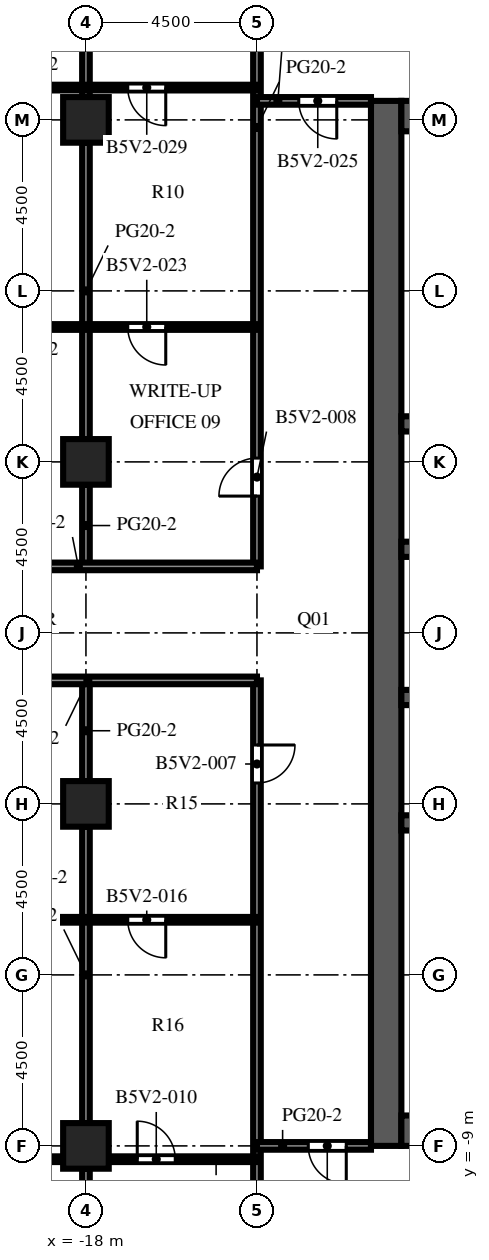
"""IFC4 building model, lengths in metres.
Left out: names, types, materials, properties, quantities, classifications, styles, units other than length and angle.
Written with IfcOpenShell. Run it as: python <this file> out.ifc"""

import sys

from ifc_helpers import new_model, si_unit, direction, frame, frame_2d, origin, origin_2d, place, context, subcontext, project, spatial, rectangle, extrude, element, fill, save


model = new_model("IFC4")
c1 = context("Model", 3, precision=1e-05, world=origin(), true_north=direction((0.0, 1.0)))
c2 = subcontext(c1, "Body", "Model", "MODEL_VIEW")
j1 = project(units=[si_unit("LENGTHUNIT", "METRE"), si_unit("PLANEANGLEUNIT", "RADIAN")], contexts=[c1])
p1 = place(None, origin())
s1 = spatial("IfcSite", under=j1, at=p1, CompositionType="ELEMENT")
p2 = place(p1, origin())
s2 = spatial("IfcBuilding", under=s1, at=p2, CompositionType="ELEMENT")
p3 = place(p2, frame((0.0, 0.0, 181.4)))
s3 = spatial("IfcBuildingStorey", under=s2, at=p3, CompositionType="ELEMENT", Elevation=181.4)
for number, where, z_axis, x_axis in (
    (1, (-18.0, -9.0, 0.0), (0.0, 0.0, 1.0), (1.0, 0.0, 0.0)),
    (2, (-18.0, 0.0, 0.0), (0.0, 0.0, 1.0), (1.0, 0.0, 0.0)),
    (3, (-18.0, 9.0, 0.0), (0.0, 0.0, 1.0), (1.0, 0.0, 0.0)),
    (4, (-18.0, 18.0, 0.0), (0.0, 0.0, 1.0), (1.0, 0.0, 0.0)),
):
    element("IfcColumn", number, at=place(p3, frame(where, z_axis=z_axis, x_axis=x_axis)), inside=s3, PredefinedType="COLUMN", context=c2, shape_type="SweptSolid", body=[
        extrude(rectangle(XDim=1.2, YDim=1.2, at=origin_2d()), origin(), (0.0, 0.0, 1.0), 4.1),
    ])
p4 = place(p3, frame((-10.1, -9.0, 0.0), z_axis=(0.0, 0.0, 1.0), x_axis=(0.0, 1.0, 0.0)))
e5 = element("IfcWall", 5, at=p4, inside=s3, PredefinedType="SHEAR", context=c2, shape_type="SweptSolid", body=[
    extrude(rectangle(XDim=27.5, YDim=0.8, at=frame_2d((13.75, 0.0))), origin(), (0.0, 0.0, 1.0), 4.1),
])
p5 = place(p4, frame((12.55, 0.0, 0.0)))
e6 = element("IfcOpeningElement", 6, at=p5, cuts=e5, PredefinedType="OPENING", context=c2, shape_type="SweptSolid", body=[
    extrude(rectangle(XDim=2.4, YDim=2.4, at=frame_2d((1.2, 1.2))), frame((0.0, 0.41, 0.0), z_axis=(0.0, -1.0, 0.0), x_axis=(1.0, 0.0, 0.0)), (0.0, 0.0, 1.0), 0.82),
])
p6 = place(p4, frame((6.825, 0.0, 0.0)))
e7 = element("IfcOpeningElement", 7, at=p6, cuts=e5, PredefinedType="OPENING", context=c2, shape_type="SweptSolid", body=[
    extrude(rectangle(XDim=1.2, YDim=2.1, at=frame_2d((0.6, 1.05))), frame((0.0, 0.41, 0.0), z_axis=(0.0, -1.0, 0.0), x_axis=(1.0, 0.0, 0.0)), (0.0, 0.0, 1.0), 0.82),
])
p7 = place(p4, frame((19.475, 0.0, 0.0)))
e8 = element("IfcOpeningElement", 8, at=p7, cuts=e5, PredefinedType="OPENING", context=c2, shape_type="SweptSolid", body=[
    extrude(rectangle(XDim=1.2, YDim=2.1, at=frame_2d((0.6, 1.05))), frame((0.0, 0.41, 0.0), z_axis=(0.0, -1.0, 0.0), x_axis=(1.0, 0.0, 0.0)), (0.0, 0.0, 1.0), 0.82),
])
for number, where, z_axis, x_axis in (
    (9, (-9.7, -8.6, 0.0), (0.0, 0.0, 1.0), (1.0, 0.0, 0.0)),
    (10, (-9.7, 18.1, 0.0), (0.0, 0.0, 1.0), (1.0, 0.0, 0.0)),
):
    element("IfcWall", number, at=place(p3, frame(where, z_axis=z_axis, x_axis=x_axis)), inside=s3, PredefinedType="SHEAR", context=c2, shape_type="SweptSolid", body=[
        extrude(rectangle(XDim=10.4, YDim=0.8, at=frame_2d((5.2, 0.0))), origin(), (0.0, 0.0, 1.0), 4.1),
    ])
p8 = place(p3, frame((-9.7, -0.5, 0.0), z_axis=(0.0, 0.0, 1.0), x_axis=(1.0, 0.0, 0.0)))
e11 = element("IfcWall", 11, at=p8, inside=s3, PredefinedType="SHEAR", context=c2, shape_type="SweptSolid", body=[
    extrude(rectangle(XDim=10.4, YDim=0.4, at=frame_2d((5.2, 0.0))), origin(), (0.0, 0.0, 1.0), 4.1),
])
p9 = place(p3, frame((-9.7, 2.8, 0.0), z_axis=(0.0, 0.0, 1.0), x_axis=(1.0, 0.0, 0.0)))
e12 = element("IfcWall", 12, at=p9, inside=s3, PredefinedType="SHEAR", context=c2, shape_type="SweptSolid", body=[
    extrude(rectangle(XDim=10.4, YDim=0.4, at=frame_2d((5.2, 0.0))), origin(), (0.0, 0.0, 1.0), 4.1),
])
p10 = place(p9, frame((0.738, 0.0, 0.0)))
e13 = element("IfcOpeningElement", 13, at=p10, cuts=e12, PredefinedType="OPENING", context=c2, shape_type="SweptSolid", body=[
    extrude(rectangle(XDim=1.1, YDim=2.1, at=frame_2d((0.55, 1.05))), frame((0.0, 0.21, 0.0), z_axis=(0.0, -1.0, 0.0), x_axis=(1.0, 0.0, 0.0)), (0.0, 0.0, 1.0), 0.42),
])
p11 = place(p9, frame((3.337, 0.0, 0.0)))
e14 = element("IfcOpeningElement", 14, at=p11, cuts=e12, PredefinedType="OPENING", context=c2, shape_type="SweptSolid", body=[
    extrude(rectangle(XDim=1.1, YDim=2.1, at=frame_2d((0.55, 1.05))), frame((0.0, 0.21, 0.0), z_axis=(0.0, -1.0, 0.0), x_axis=(1.0, 0.0, 0.0)), (0.0, 0.0, 1.0), 0.42),
])
p12 = place(p9, frame((6.012, 0.0, 0.0)))
e15 = element("IfcOpeningElement", 15, at=p12, cuts=e12, PredefinedType="OPENING", context=c2, shape_type="SweptSolid", body=[
    extrude(rectangle(XDim=1.0, YDim=2.1, at=frame_2d((0.5, 1.05))), frame((0.0, 0.21, 0.0), z_axis=(0.0, -1.0, 0.0), x_axis=(1.0, 0.0, 0.0)), (0.0, 0.0, 1.0), 0.42),
])
p13 = place(p9, frame((8.613, 0.0, 0.0)))
e16 = element("IfcOpeningElement", 16, at=p13, cuts=e12, PredefinedType="OPENING", context=c2, shape_type="SweptSolid", body=[
    extrude(rectangle(XDim=1.0, YDim=2.1, at=frame_2d((0.5, 1.05))), frame((0.0, 0.21, 0.0), z_axis=(0.0, -1.0, 0.0), x_axis=(1.0, 0.0, 0.0)), (0.0, 0.0, 1.0), 0.42),
])
p14 = place(p3, frame((-9.7, 6.7, 0.0), z_axis=(0.0, 0.0, 1.0), x_axis=(1.0, 0.0, 0.0)))
e17 = element("IfcWall", 17, at=p14, inside=s3, PredefinedType="SHEAR", context=c2, shape_type="SweptSolid", body=[
    extrude(rectangle(XDim=10.4, YDim=0.4, at=frame_2d((5.2, 0.0))), origin(), (0.0, 0.0, 1.0), 4.1),
])
p15 = place(p14, frame((3.337, 0.0, 0.0)))
e18 = element("IfcOpeningElement", 18, at=p15, cuts=e17, PredefinedType="OPENING", context=c2, shape_type="SweptSolid", body=[
    extrude(rectangle(XDim=1.1, YDim=2.1, at=frame_2d((0.55, 1.05))), frame((0.0, 0.21, 0.0), z_axis=(0.0, -1.0, 0.0), x_axis=(1.0, 0.0, 0.0)), (0.0, 0.0, 1.0), 0.42),
])
p16 = place(p14, frame((5.962, 0.0, 0.0)))
e19 = element("IfcOpeningElement", 19, at=p16, cuts=e17, PredefinedType="OPENING", context=c2, shape_type="SweptSolid", body=[
    extrude(rectangle(XDim=1.1, YDim=2.1, at=frame_2d((0.55, 1.05))), frame((0.0, 0.21, 0.0), z_axis=(0.0, -1.0, 0.0), x_axis=(1.0, 0.0, 0.0)), (0.0, 0.0, 1.0), 0.42),
])
p17 = place(p14, frame((8.663, 0.0, 0.0)))
e20 = element("IfcOpeningElement", 20, at=p17, cuts=e17, PredefinedType="OPENING", context=c2, shape_type="SweptSolid", body=[
    extrude(rectangle(XDim=1.1, YDim=2.1, at=frame_2d((0.55, 1.05))), frame((0.0, 0.21, 0.0), z_axis=(0.0, -1.0, 0.0), x_axis=(1.0, 0.0, 0.0)), (0.0, 0.0, 1.0), 0.42),
])
p18 = place(p14, frame((0.688, 0.0, 0.0)))
e21 = element("IfcOpeningElement", 21, at=p18, cuts=e17, PredefinedType="OPENING", context=c2, shape_type="SweptSolid", body=[
    extrude(rectangle(XDim=1.0, YDim=2.1, at=frame_2d((0.5, 1.05))), frame((0.0, 0.21, 0.0), z_axis=(0.0, -1.0, 0.0), x_axis=(1.0, 0.0, 0.0)), (0.0, 0.0, 1.0), 0.42),
])
p19 = place(p3, frame((-9.7, 10.0, 0.0), z_axis=(0.0, 0.0, 1.0), x_axis=(1.0, 0.0, 0.0)))
e22 = element("IfcWall", 22, at=p19, inside=s3, PredefinedType="SHEAR", context=c2, shape_type="SweptSolid", body=[
    extrude(rectangle(XDim=10.4, YDim=0.4, at=frame_2d((5.2, 0.0))), origin(), (0.0, 0.0, 1.0), 4.1),
])
for number, where, z_axis, x_axis in (
    (23, (-18.0, -17.4, 0.0), (0.0, 0.0, 1.0), (0.0, 1.0, 0.0)),
    (24, (-18.0, -8.4, 0.0), (0.0, 0.0, 1.0), (0.0, 1.0, 0.0)),
):
    element("IfcWall", number, at=place(p3, frame(where, z_axis=z_axis, x_axis=x_axis)), inside=s3, PredefinedType="PARTITIONING", context=c2, shape_type="SweptSolid", body=[
        extrude(rectangle(XDim=7.8, YDim=0.2, at=frame_2d((3.9, 0.0))), origin(), (0.0, 0.0, 1.0), 3.5),
    ])
p20 = place(p3, frame((-18.0, 0.6, 0.0), z_axis=(0.0, 0.0, 1.0), x_axis=(0.0, 1.0, 0.0)))
e25 = element("IfcWall", 25, at=p20, inside=s3, PredefinedType="PARTITIONING", context=c2, shape_type="SweptSolid", body=[
    extrude(rectangle(XDim=2.65, YDim=0.2, at=frame_2d((1.325, 0.0))), origin(), (0.0, 0.0, 1.0), 3.5),
])
p21 = place(p3, frame((-18.0, 6.25, 0.0), z_axis=(0.0, 0.0, 1.0), x_axis=(0.0, 1.0, 0.0)))
e26 = element("IfcWall", 26, at=p21, inside=s3, PredefinedType="PARTITIONING", context=c2, shape_type="SweptSolid", body=[
    extrude(rectangle(XDim=2.15, YDim=0.2, at=frame_2d((1.075, 0.0))), origin(), (0.0, 0.0, 1.0), 3.5),
])
p22 = place(p3, frame((-18.0, 9.6, 0.0), z_axis=(0.0, 0.0, 1.0), x_axis=(0.0, 1.0, 0.0)))
e27 = element("IfcWall", 27, at=p22, inside=s3, PredefinedType="PARTITIONING", context=c2, shape_type="SweptSolid", body=[
    extrude(rectangle(XDim=7.8, YDim=0.2, at=frame_2d((3.9, 0.0))), origin(), (0.0, 0.0, 1.0), 3.5),
])
p23 = place(p3, frame((-18.0, 18.6, 0.0), z_axis=(0.0, 0.0, 1.0), x_axis=(0.0, 1.0, 0.0)))
e28 = element("IfcWall", 28, at=p23, inside=s3, PredefinedType="PARTITIONING", context=c2, shape_type="SweptSolid", body=[
    extrude(rectangle(XDim=3.3, YDim=0.2, at=frame_2d((1.65, 0.0))), origin(), (0.0, 0.0, 1.0), 3.5),
])
p24 = place(p3, frame((-13.5, -26.5, 0.0), z_axis=(0.0, 0.0, 1.0), x_axis=(0.0, 1.0, 0.0)))
e29 = element("IfcWall", 29, at=p24, inside=s3, PredefinedType="PARTITIONING", context=c2, shape_type="SweptSolid", body=[
    extrude(rectangle(XDim=29.75, YDim=0.2, at=frame_2d((14.875, 0.0))), origin(), (0.0, 0.0, 1.0), 3.5),
])
p25 = place(p24, frame((27.05, 0.0, 0.0)))
e30 = element("IfcOpeningElement", 30, at=p25, cuts=e29, PredefinedType="OPENING", context=c2, shape_type="SweptSolid", body=[
    extrude(rectangle(XDim=1.0, YDim=2.1, at=frame_2d((0.5, 1.05))), frame((0.0, 0.11, 0.0), z_axis=(0.0, -1.0, 0.0), x_axis=(1.0, 0.0, 0.0)), (0.0, 0.0, 1.0), 0.22),
])
p26 = place(p3, frame((-13.5, 6.25, 0.0), z_axis=(0.0, 0.0, 1.0), x_axis=(0.0, 1.0, 0.0)))
e31 = element("IfcWall", 31, at=p26, inside=s3, PredefinedType="PARTITIONING", context=c2, shape_type="SweptSolid", body=[
    extrude(rectangle(XDim=20.25, YDim=0.2, at=frame_2d((10.125, 0.0))), origin(), (0.0, 0.0, 1.0), 3.5),
])
p27 = place(p26, frame((1.85, 0.0, 0.0)))
e32 = element("IfcOpeningElement", 32, at=p27, cuts=e31, PredefinedType="OPENING", context=c2, shape_type="SweptSolid", body=[
    extrude(rectangle(XDim=1.0, YDim=2.1, at=frame_2d((0.5, 1.05))), frame((0.0, 0.11, 0.0), z_axis=(0.0, -1.0, 0.0), x_axis=(1.0, 0.0, 0.0)), (0.0, 0.0, 1.0), 0.22),
])
p28 = place(p3, frame((-18.6, -9.35, 0.0), z_axis=(0.0, 0.0, 1.0), x_axis=(-1.0, 0.0, 0.0)))
e33 = element("IfcWall", 33, at=p28, inside=s3, PredefinedType="PARTITIONING", context=c2, shape_type="SweptSolid", body=[
    extrude(rectangle(XDim=7.9, YDim=0.15, at=frame_2d((3.95, 0.0))), origin(), (0.0, 0.0, 1.0), 3.5),
])
p29 = place(p28, frame((2.8, 0.0, 0.0)))
e34 = element("IfcOpeningElement", 34, at=p29, cuts=e33, PredefinedType="OPENING", context=c2, shape_type="SweptSolid", body=[
    extrude(rectangle(XDim=1.0, YDim=2.1, at=frame_2d((0.5, 1.05))), frame((0.0, 0.085, 0.0), z_axis=(0.0, -1.0, 0.0), x_axis=(1.0, 0.0, 0.0)), (0.0, 0.0, 1.0), 0.17),
])
p30 = place(p3, frame((-13.5, -9.35, 0.0), z_axis=(0.0, 0.0, 1.0), x_axis=(-1.0, 0.0, 0.0)))
e35 = element("IfcWall", 35, at=p30, inside=s3, PredefinedType="PARTITIONING", context=c2, shape_type="SweptSolid", body=[
    extrude(rectangle(XDim=3.9, YDim=0.15, at=frame_2d((1.95, 0.0))), origin(), (0.0, 0.0, 1.0), 3.5),
])
p31 = place(p30, frame((2.15, 0.0, 0.0)))
e36 = element("IfcOpeningElement", 36, at=p31, cuts=e35, PredefinedType="OPENING", context=c2, shape_type="SweptSolid", body=[
    extrude(rectangle(XDim=1.0, YDim=2.1, at=frame_2d((0.5, 1.05))), frame((0.0, 0.085, 0.0), z_axis=(0.0, -1.0, 0.0), x_axis=(1.0, 0.0, 0.0)), (0.0, 0.0, 1.0), 0.17),
])
p32 = place(p3, frame((-10.5, -9.0, 0.0), z_axis=(0.0, 0.0, 1.0), x_axis=(-1.0, 0.0, 0.0)))
e37 = element("IfcWall", 37, at=p32, inside=s3, PredefinedType="PARTITIONING", context=c2, shape_type="SweptSolid", body=[
    extrude(rectangle(XDim=3.0, YDim=0.2, at=frame_2d((1.5, 0.0))), origin(), (0.0, 0.0, 1.0), 3.5),
])
p33 = place(p32, frame((0.65, 0.0, 0.0)))
e38 = element("IfcOpeningElement", 38, at=p33, cuts=e37, PredefinedType="OPENING", context=c2, shape_type="SweptSolid", body=[
    extrude(rectangle(XDim=1.0, YDim=2.1, at=frame_2d((0.5, 1.05))), frame((0.0, 0.11, 0.0), z_axis=(0.0, -1.0, 0.0), x_axis=(1.0, 0.0, 0.0)), (0.0, 0.0, 1.0), 0.22),
])
p34 = place(p3, frame((-13.5, -3.05, 0.0), z_axis=(0.0, 0.0, 1.0), x_axis=(-1.0, 0.0, 0.0)))
e39 = element("IfcWall", 39, at=p34, inside=s3, PredefinedType="PARTITIONING", context=c2, shape_type="SweptSolid", body=[
    extrude(rectangle(XDim=13.35, YDim=0.15, at=frame_2d((6.675, 0.0))), origin(), (0.0, 0.0, 1.0), 3.5),
])
p35 = place(p34, frame((8.15, 0.0, 0.0)))
e40 = element("IfcOpeningElement", 40, at=p35, cuts=e39, PredefinedType="OPENING", context=c2, shape_type="SweptSolid", body=[
    extrude(rectangle(XDim=1.0, YDim=2.1, at=frame_2d((0.5, 1.05))), frame((0.0, 0.085, 0.0), z_axis=(0.0, -1.0, 0.0), x_axis=(1.0, 0.0, 0.0)), (0.0, 0.0, 1.0), 0.17),
])
p36 = place(p34, frame((2.4, 0.0, 0.0)))
e41 = element("IfcOpeningElement", 41, at=p36, cuts=e39, PredefinedType="OPENING", context=c2, shape_type="SweptSolid", body=[
    extrude(rectangle(XDim=1.0, YDim=2.1, at=frame_2d((0.5, 1.05))), frame((0.0, 0.085, 0.0), z_axis=(0.0, -1.0, 0.0), x_axis=(1.0, 0.0, 0.0)), (0.0, 0.0, 1.0), 0.17),
])
p37 = place(p3, frame((-13.5, 3.25, 0.0), z_axis=(0.0, 0.0, 1.0), x_axis=(-1.0, 0.0, 0.0)))
e42 = element("IfcWall", 42, at=p37, inside=s3, PredefinedType="PARTITIONING", context=c2, shape_type="SweptSolid", body=[
    extrude(rectangle(XDim=13.35, YDim=0.2, at=frame_2d((6.675, 0.0))), origin(), (0.0, 0.0, 1.0), 3.5),
])
p38 = place(p37, frame((8.9, 0.0, 0.0)))
e43 = element("IfcOpeningElement", 43, at=p38, cuts=e42, PredefinedType="OPENING", context=c2, shape_type="SweptSolid", body=[
    extrude(rectangle(XDim=1.0, YDim=2.1, at=frame_2d((0.5, 1.05))), frame((0.0, 0.11, 0.0), z_axis=(0.0, -1.0, 0.0), x_axis=(1.0, 0.0, 0.0)), (0.0, 0.0, 1.0), 0.22),
])
p39 = place(p3, frame((-26.85, 6.25, 0.0), z_axis=(0.0, 0.0, 1.0), x_axis=(1.0, 0.0, 0.0)))
e44 = element("IfcWall", 44, at=p39, inside=s3, PredefinedType="PARTITIONING", context=c2, shape_type="SweptSolid", body=[
    extrude(rectangle(XDim=13.35, YDim=0.2, at=frame_2d((6.675, 0.0))), origin(), (0.0, 0.0, 1.0), 3.5),
])
p40 = place(p39, frame((2.95, 0.0, 0.0)))
e45 = element("IfcOpeningElement", 45, at=p40, cuts=e44, PredefinedType="OPENING", context=c2, shape_type="SweptSolid", body=[
    extrude(rectangle(XDim=1.0, YDim=2.1, at=frame_2d((0.5, 1.05))), frame((0.0, 0.11, 0.0), z_axis=(0.0, -1.0, 0.0), x_axis=(1.0, 0.0, 0.0)), (0.0, 0.0, 1.0), 0.22),
])
p41 = place(p3, frame((-26.85, 12.55, 0.0), z_axis=(0.0, 0.0, 1.0), x_axis=(1.0, 0.0, 0.0)))
e46 = element("IfcWall", 46, at=p41, inside=s3, PredefinedType="PARTITIONING", context=c2, shape_type="SweptSolid", body=[
    extrude(rectangle(XDim=13.35, YDim=0.15, at=frame_2d((6.675, 0.0))), origin(), (0.0, 0.0, 1.0), 3.5),
])
p42 = place(p41, frame((3.7, 0.0, 0.0)))
e47 = element("IfcOpeningElement", 47, at=p42, cuts=e46, PredefinedType="OPENING", context=c2, shape_type="SweptSolid", body=[
    extrude(rectangle(XDim=1.0, YDim=2.1, at=frame_2d((0.5, 1.05))), frame((0.0, 0.085, 0.0), z_axis=(0.0, -1.0, 0.0), x_axis=(1.0, 0.0, 0.0)), (0.0, 0.0, 1.0), 0.17),
])
p43 = place(p41, frame((9.95, 0.0, 0.0)))
e48 = element("IfcOpeningElement", 48, at=p43, cuts=e46, PredefinedType="OPENING", context=c2, shape_type="SweptSolid", body=[
    extrude(rectangle(XDim=1.0, YDim=2.1, at=frame_2d((0.5, 1.05))), frame((0.0, 0.085, 0.0), z_axis=(0.0, -1.0, 0.0), x_axis=(1.0, 0.0, 0.0)), (0.0, 0.0, 1.0), 0.17),
])
p44 = place(p3, frame((-13.5, 18.5, 0.0), z_axis=(0.0, 0.0, 1.0), x_axis=(1.0, 0.0, 0.0)))
e49 = element("IfcWall", 49, at=p44, inside=s3, PredefinedType="PARTITIONING", context=c2, shape_type="SweptSolid", body=[
    extrude(rectangle(XDim=3.0, YDim=0.2, at=frame_2d((1.5, 0.0))), origin(), (0.0, 0.0, 1.0), 3.5),
])
p45 = place(p44, frame((1.1, 0.0, 0.0)))
e50 = element("IfcOpeningElement", 50, at=p45, cuts=e49, PredefinedType="OPENING", context=c2, shape_type="SweptSolid", body=[
    extrude(rectangle(XDim=1.0, YDim=2.1, at=frame_2d((0.5, 1.05))), frame((0.0, 0.11, 0.0), z_axis=(0.0, -1.0, 0.0), x_axis=(1.0, 0.0, 0.0)), (0.0, 0.0, 1.0), 0.22),
])
p46 = place(p3, frame((-26.85, 18.85, 0.0), z_axis=(0.0, 0.0, 1.0), x_axis=(1.0, 0.0, 0.0)))
e51 = element("IfcWall", 51, at=p46, inside=s3, PredefinedType="PARTITIONING", context=c2, shape_type="SweptSolid", body=[
    extrude(rectangle(XDim=13.35, YDim=0.15, at=frame_2d((6.675, 0.0))), origin(), (0.0, 0.0, 1.0), 3.5),
])
p47 = place(p46, frame((3.7, 0.0, 0.0)))
e52 = element("IfcOpeningElement", 52, at=p47, cuts=e51, PredefinedType="OPENING", context=c2, shape_type="SweptSolid", body=[
    extrude(rectangle(XDim=1.0, YDim=2.1, at=frame_2d((0.5, 1.05))), frame((0.0, 0.085, 0.0), z_axis=(0.0, -1.0, 0.0), x_axis=(1.0, 0.0, 0.0)), (0.0, 0.0, 1.0), 0.17),
])
p48 = place(p46, frame((9.95, 0.0, 0.0)))
e53 = element("IfcOpeningElement", 53, at=p48, cuts=e51, PredefinedType="OPENING", context=c2, shape_type="SweptSolid", body=[
    extrude(rectangle(XDim=1.0, YDim=2.1, at=frame_2d((0.5, 1.05))), frame((0.0, 0.085, 0.0), z_axis=(0.0, -1.0, 0.0), x_axis=(1.0, 0.0, 0.0)), (0.0, 0.0, 1.0), 0.17),
])
p49 = place(p5, origin())
e54 = element("IfcDoor", 54, at=p49, inside=s3, OperationType="DOUBLE_DOOR_DOUBLE_SWING", PredefinedType="DOOR", context=c2, shape_type="SweptSolid", body=[
    extrude(rectangle(XDim=2.4, YDim=2.4, at=frame_2d((1.2, 1.2))), frame((0.0, 0.025, 0.0), z_axis=(0.0, -1.0, 0.0), x_axis=(1.0, 0.0, 0.0)), (0.0, 0.0, 1.0), 0.05),
])
fill(e6, e54)
p50 = place(p6, origin())
e55 = element("IfcDoor", 55, at=p50, inside=s3, OperationType="SINGLE_SWING_LEFT", PredefinedType="DOOR", context=c2, shape_type="SweptSolid", body=[
    extrude(rectangle(XDim=1.2, YDim=2.1, at=frame_2d((0.6, 1.05))), frame((0.0, 0.025, 0.0), z_axis=(0.0, -1.0, 0.0), x_axis=(1.0, 0.0, 0.0)), (0.0, 0.0, 1.0), 0.05),
])
fill(e7, e55)
p51 = place(p7, origin())
e56 = element("IfcDoor", 56, at=p51, inside=s3, OperationType="SINGLE_SWING_LEFT", PredefinedType="DOOR", context=c2, shape_type="SweptSolid", body=[
    extrude(rectangle(XDim=1.2, YDim=2.1, at=frame_2d((0.6, 1.05))), frame((0.0, 0.025, 0.0), z_axis=(0.0, -1.0, 0.0), x_axis=(1.0, 0.0, 0.0)), (0.0, 0.0, 1.0), 0.05),
])
fill(e8, e56)
p52 = place(p25, origin())
e57 = element("IfcDoor", 57, at=p52, inside=s3, OperationType="SINGLE_SWING_RIGHT", PredefinedType="DOOR", context=c2, shape_type="SweptSolid", body=[
    extrude(rectangle(XDim=1.0, YDim=2.1, at=frame_2d((0.5, 1.05))), frame((0.0, 0.025, 0.0), z_axis=(0.0, -1.0, 0.0), x_axis=(1.0, 0.0, 0.0)), (0.0, 0.0, 1.0), 0.05),
])
fill(e30, e57)
p53 = place(p27, origin())
e58 = element("IfcDoor", 58, at=p53, inside=s3, OperationType="SINGLE_SWING_LEFT", PredefinedType="DOOR", context=c2, shape_type="SweptSolid", body=[
    extrude(rectangle(XDim=1.0, YDim=2.1, at=frame_2d((0.5, 1.05))), frame((0.0, 0.025, 0.0), z_axis=(0.0, -1.0, 0.0), x_axis=(1.0, 0.0, 0.0)), (0.0, 0.0, 1.0), 0.05),
])
fill(e32, e58)
p54 = place(p31, origin())
e59 = element("IfcDoor", 59, at=p54, inside=s3, OperationType="SINGLE_SWING_RIGHT", PredefinedType="DOOR", context=c2, shape_type="SweptSolid", body=[
    extrude(rectangle(XDim=1.0, YDim=2.1, at=frame_2d((0.5, 1.05))), frame((0.0, 0.025, 0.0), z_axis=(0.0, -1.0, 0.0), x_axis=(1.0, 0.0, 0.0)), (0.0, 0.0, 1.0), 0.05),
])
fill(e36, e59)
p55 = place(p33, origin())
e60 = element("IfcDoor", 60, at=p55, inside=s3, OperationType="SINGLE_SWING_LEFT", PredefinedType="DOOR", context=c2, shape_type="SweptSolid", body=[
    extrude(rectangle(XDim=1.0, YDim=2.1, at=frame_2d((0.5, 1.05))), frame((0.0, 0.025, 0.0), z_axis=(0.0, -1.0, 0.0), x_axis=(1.0, 0.0, 0.0)), (0.0, 0.0, 1.0), 0.05),
])
fill(e38, e60)
p56 = place(p36, origin())
e61 = element("IfcDoor", 61, at=p56, inside=s3, OperationType="SINGLE_SWING_LEFT", PredefinedType="DOOR", context=c2, shape_type="SweptSolid", body=[
    extrude(rectangle(XDim=1.0, YDim=2.1, at=frame_2d((0.5, 1.05))), frame((0.0, 0.025, 0.0), z_axis=(0.0, -1.0, 0.0), x_axis=(1.0, 0.0, 0.0)), (0.0, 0.0, 1.0), 0.05),
])
fill(e41, e61)
p57 = place(p43, origin())
e62 = element("IfcDoor", 62, at=p57, inside=s3, OperationType="SINGLE_SWING_RIGHT", PredefinedType="DOOR", context=c2, shape_type="SweptSolid", body=[
    extrude(rectangle(XDim=1.0, YDim=2.1, at=frame_2d((0.5, 1.05))), frame((0.0, 0.025, 0.0), z_axis=(0.0, -1.0, 0.0), x_axis=(1.0, 0.0, 0.0)), (0.0, 0.0, 1.0), 0.05),
])
fill(e48, e62)
p58 = place(p45, origin())
e63 = element("IfcDoor", 63, at=p58, inside=s3, OperationType="SINGLE_SWING_RIGHT", PredefinedType="DOOR", context=c2, shape_type="SweptSolid", body=[
    extrude(rectangle(XDim=1.0, YDim=2.1, at=frame_2d((0.5, 1.05))), frame((0.0, 0.025, 0.0), z_axis=(0.0, -1.0, 0.0), x_axis=(1.0, 0.0, 0.0)), (0.0, 0.0, 1.0), 0.05),
])
fill(e50, e63)
p59 = place(p48, origin())
e64 = element("IfcDoor", 64, at=p59, inside=s3, OperationType="SINGLE_SWING_RIGHT", PredefinedType="DOOR", context=c2, shape_type="SweptSolid", body=[
    extrude(rectangle(XDim=1.0, YDim=2.1, at=frame_2d((0.5, 1.05))), frame((0.0, 0.025, 0.0), z_axis=(0.0, -1.0, 0.0), x_axis=(1.0, 0.0, 0.0)), (0.0, 0.0, 1.0), 0.05),
])
fill(e53, e64)
save(model, sys.argv[1])
